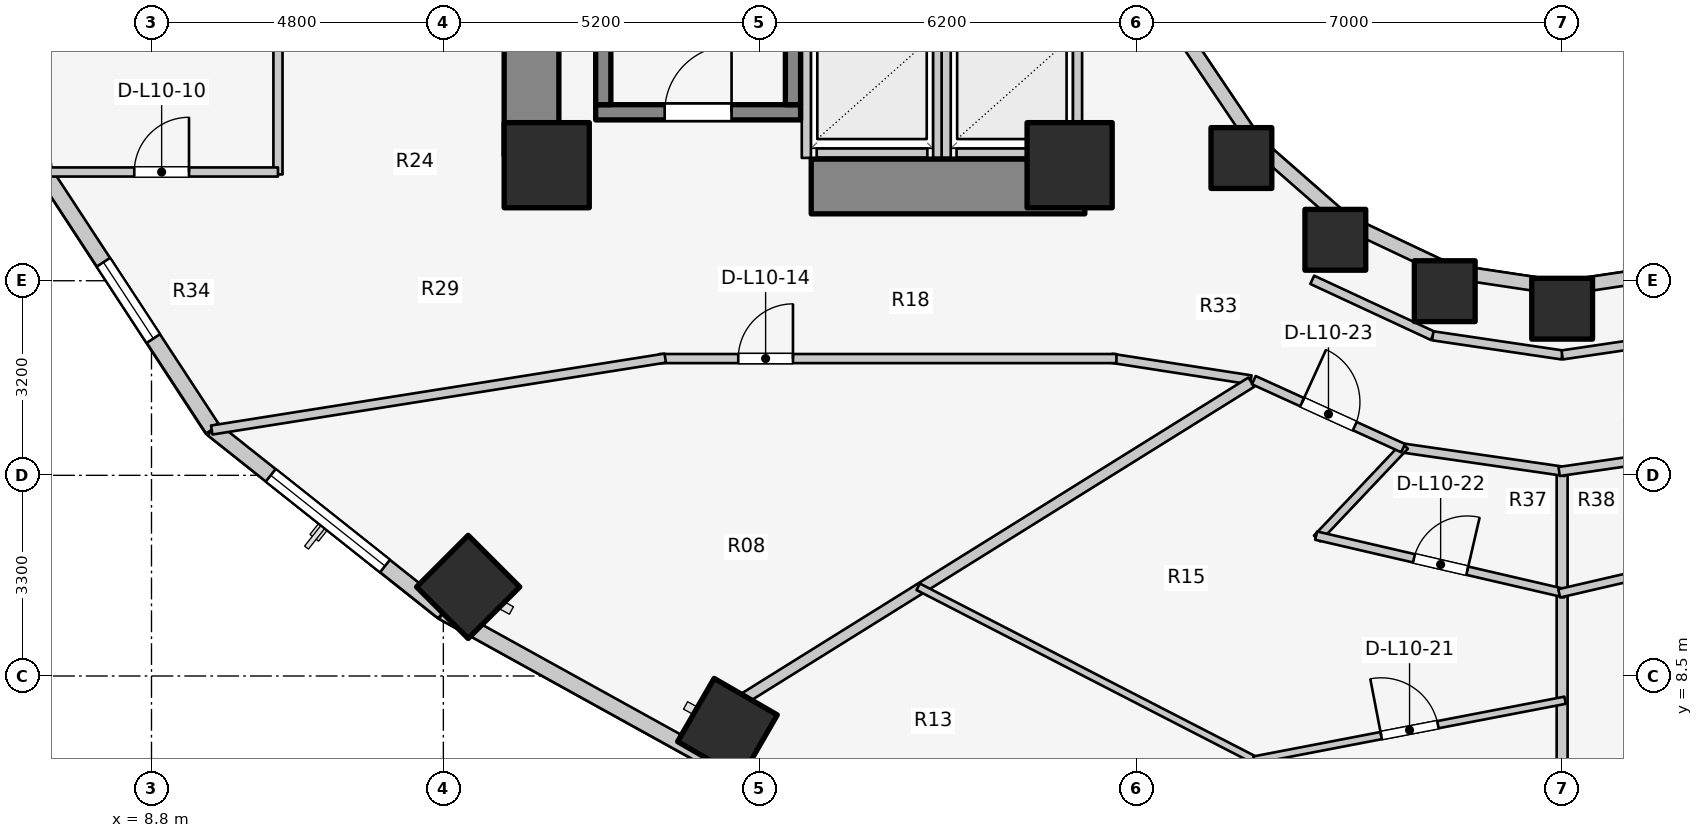
"""IFC4 building model, lengths in metres.
Left out: names, types, materials, properties, quantities, classifications, styles, units other than length and angle.
Written with IfcOpenShell. Run it as: python <this file> out.ifc"""

import sys

from ifc_helpers import new_model, si_unit, direction, frame, frame_2d, origin, origin_2d, place, context, subcontext, project, spatial, rectangle, extrude, element, fill, save


model = new_model("IFC4")
c1 = context("Model", 3, precision=1e-05, world=origin(), true_north=direction((0.0, 1.0)))
c2 = subcontext(c1, "Body", "Model", "MODEL_VIEW")
j1 = project(units=[si_unit("LENGTHUNIT", "METRE"), si_unit("PLANEANGLEUNIT", "RADIAN")], contexts=[c1])
p1 = place(None, origin())
s1 = spatial("IfcSite", under=j1, at=p1, CompositionType="ELEMENT")
p2 = place(p1, origin())
s2 = spatial("IfcBuilding", under=s1, at=p2, CompositionType="ELEMENT")
p3 = place(p2, frame((0.0, 0.0, 36.9)))
s3 = spatial("IfcBuildingStorey", under=s2, at=p3, CompositionType="ELEMENT", Elevation=36.9)
p4 = place(p3, frame((15.05, 17.05, 0.0), z_axis=(0.0, 0.0, 1.0), x_axis=(0.0, 1.0, 0.0)))
e1 = element("IfcWall", 1, at=p4, inside=s3, PredefinedType="SHEAR", context=c2, shape_type="SweptSolid", body=[
    extrude(rectangle(XDim=12.8, YDim=0.9, at=frame_2d((6.4, 0.0))), origin(), (0.0, 0.0, 1.0), 3.1),
])
p5 = place(p3, frame((19.65, 16.55, 0.0), z_axis=(0.0, 0.0, 1.0), x_axis=(1.0, 0.0, 0.0)))
e2 = element("IfcWall", 2, at=p5, inside=s3, PredefinedType="SHEAR", context=c2, shape_type="SweptSolid", body=[
    extrude(rectangle(XDim=4.5, YDim=0.9, at=frame_2d((2.25, 0.0))), origin(), (0.0, 0.0, 1.0), 3.1),
])
p6 = place(p3, frame((16.105, 17.77, 0.0), z_axis=(0.0, 0.0, 1.0), x_axis=(1.0, 0.0, 0.0)))
e3 = element("IfcWall", 3, at=p6, inside=s3, PredefinedType="SOLIDWALL", context=c2, shape_type="SweptSolid", body=[
    extrude(rectangle(XDim=3.37, YDim=0.25, at=frame_2d((1.685, 0.0))), origin(), (0.0, 0.0, 1.0), 3.1),
])
p7 = place(p6, frame((1.135, 0.0, 0.0)))
e4 = element("IfcOpeningElement", 4, at=p7, cuts=e3, PredefinedType="OPENING", context=c2, shape_type="SweptSolid", body=[
    extrude(rectangle(XDim=1.1, YDim=2.1, at=frame_2d((0.55, 1.05))), frame((0.0, 0.135, 0.0), z_axis=(0.0, -1.0, 0.0), x_axis=(1.0, 0.0, 0.0)), (0.0, 0.0, 1.0), 0.27),
])
for number, where, z_axis, x_axis in (
    (5, (16.23, 17.895, 0.0), (0.0, 0.0, 1.0), (0.0, 1.0, 0.0)),
    (6, (19.35, 17.895, 0.0), (0.0, 0.0, 1.0), (0.0, 1.0, 0.0)),
):
    element("IfcWall", number, at=place(p3, frame(where, z_axis=z_axis, x_axis=x_axis)), inside=s3, PredefinedType="SOLIDWALL", context=c2, shape_type="SweptSolid", body=[
        extrude(rectangle(XDim=7.81, YDim=0.25, at=frame_2d((3.905, 0.0))), origin(), (0.0, 0.0, 1.0), 3.1),
    ])
for number, where, z_axis, x_axis in (
    (7, (15.3, 16.9, 0.0), (0.0, 0.0, 1.0), (1.0, 0.0, 0.0)),
    (8, (23.9, 16.9, 0.0), (0.0, 0.0, 1.0), (1.0, 0.0, 0.0)),
):
    element("IfcColumn", number, at=place(p3, frame(where, z_axis=z_axis, x_axis=x_axis)), inside=s3, PredefinedType="COLUMN", context=c2, shape_type="SweptSolid", body=[
        extrude(rectangle(XDim=1.4, YDim=1.4, at=origin_2d()), origin(), (0.0, 0.0, 1.0), 3.1),
    ])
p8 = place(p3, frame((26.725, 17.018, 0.0), z_axis=(0.0, 0.0, 1.0), x_axis=(1.0, 0.0, 0.0)))
e9 = element("IfcColumn", 9, at=p8, inside=s3, PredefinedType="COLUMN", context=c2, shape_type="SweptSolid", body=[
    extrude(rectangle(XDim=1.0, YDim=1.0, at=origin_2d()), origin(), (0.0, 0.0, 1.0), 3.1),
])
p9 = place(p3, frame((14.008, 9.965, 0.0), z_axis=(0.0, 0.0, 1.0), x_axis=(-0.707106781187, -0.707106781187, 0.0)))
e10 = element("IfcColumn", 10, at=p9, inside=s3, PredefinedType="COLUMN", context=c2, shape_type="SweptSolid", body=[
    extrude(rectangle(XDim=1.2, YDim=1.2, at=origin_2d()), origin(), (0.0, 0.0, 1.0), 3.1),
])
p10 = place(p3, frame((28.27, 15.673, 0.0), z_axis=(0.0, 0.0, 1.0), x_axis=(1.0, 0.0, 0.0)))
e11 = element("IfcColumn", 11, at=p10, inside=s3, PredefinedType="COLUMN", context=c2, shape_type="SweptSolid", body=[
    extrude(rectangle(XDim=1.0, YDim=1.0, at=origin_2d()), origin(), (0.0, 0.0, 1.0), 3.1),
])
p11 = place(p3, frame((18.273, 7.641, 0.0), z_axis=(0.0, 0.0, 1.0), x_axis=(-0.5, -0.866025403784, 0.0)))
e12 = element("IfcColumn", 12, at=p11, inside=s3, PredefinedType="COLUMN", context=c2, shape_type="SweptSolid", body=[
    extrude(rectangle(XDim=1.2, YDim=1.2, at=origin_2d()), origin(), (0.0, 0.0, 1.0), 3.1),
])
for number, where, z_axis, x_axis in (
    (13, (30.069, 14.828, 0.0), (0.0, 0.0, 1.0), (1.0, 0.0, 0.0)),
    (14, (32.0, 14.54, 0.0), (0.0, 0.0, 1.0), (1.0, 0.0, 0.0)),
):
    element("IfcColumn", number, at=place(p3, frame(where, z_axis=z_axis, x_axis=x_axis)), inside=s3, PredefinedType="COLUMN", context=c2, shape_type="SweptSolid", body=[
        extrude(rectangle(XDim=1.0, YDim=1.0, at=origin_2d()), origin(), (0.0, 0.0, 1.0), 3.1),
    ])
p12 = place(p3, frame((25.834, 18.94, 0.0), z_axis=(0.0, 0.0, 1.0), x_axis=(0.558197800898, -0.829707909492, 0.0)))
e15 = element("IfcWall", 15, at=p12, inside=s3, PredefinedType="STANDARD", context=c2, shape_type="SweptSolid", body=[
    extrude(rectangle(XDim=2.027, YDim=0.23, at=frame_2d((1.013, 0.0))), origin(), (0.0, 0.0, 1.0), 2.16),
])
p13 = place(p3, frame((26.965, 17.258, 0.0), z_axis=(0.0, 0.0, 1.0), x_axis=(0.752576694707, -0.658504607869, 0.0)))
e16 = element("IfcWall", 16, at=p13, inside=s3, PredefinedType="STANDARD", context=c2, shape_type="SweptSolid", body=[
    extrude(rectangle(XDim=1.959, YDim=0.23, at=frame_2d((0.98, 0.0))), origin(), (0.0, 0.0, 1.0), 2.16),
])
p14 = place(p3, frame((28.44, 15.968, 0.0), z_axis=(0.0, 0.0, 1.0), x_axis=(0.904179699603, -0.427152280606, 0.0)))
e17 = element("IfcWall", 17, at=p14, inside=s3, PredefinedType="STANDARD", context=c2, shape_type="SweptSolid", body=[
    extrude(rectangle(XDim=1.899, YDim=0.23, at=frame_2d((0.95, 0.0))), origin(), (0.0, 0.0, 1.0), 2.16),
])
for number, where, z_axis, x_axis in (
    (18, (30.157, 15.157, 0.0), (0.0, 0.0, 1.0), (0.989, -0.149, 0.0)),
    (19, (32.0, 14.88, 0.0), (0.0, 0.0, 1.0), (0.989, 0.149, 0.0)),
):
    element("IfcWall", number, at=place(p3, frame(where, z_axis=z_axis, x_axis=x_axis)), inside=s3, PredefinedType="STANDARD", context=c2, shape_type="SweptSolid", body=[
        extrude(rectangle(XDim=1.864, YDim=0.23, at=frame_2d((0.932, 0.0))), origin(), (0.0, 0.0, 1.0), 2.16),
    ])
p15 = place(p3, frame((7.033, 16.795, 0.0), z_axis=(0.0, 0.0, 1.0), x_axis=(0.547702757047, -0.836672988642, 0.0)))
e20 = element("IfcWall", 20, at=p15, inside=s3, PredefinedType="STANDARD", context=c2, shape_type="SweptSolid", body=[
    extrude(rectangle(XDim=5.062, YDim=0.26, at=frame_2d((2.531, 0.0))), origin(), (0.0, 0.0, 1.0), 2.85),
])
p16 = place(p15, frame((1.781, 0.0, 0.75)))
e21 = element("IfcOpeningElement", 21, at=p16, cuts=e20, PredefinedType="OPENING", context=c2, shape_type="SweptSolid", body=[
    extrude(rectangle(XDim=1.5, YDim=1.6, at=frame_2d((0.75, 0.8))), frame((0.0, 0.14, 0.0), z_axis=(0.0, -1.0, 0.0), x_axis=(1.0, 0.0, 0.0)), (0.0, 0.0, 1.0), 0.28),
])
p17 = place(p3, frame((9.806, 12.559, 0.0), z_axis=(0.0, 0.0, 1.0), x_axis=(0.783123133379, -0.621866672179, 0.0)))
e22 = element("IfcWall", 22, at=p17, inside=s3, PredefinedType="STANDARD", context=c2, shape_type="SweptSolid", body=[
    extrude(rectangle(XDim=4.839, YDim=0.26, at=frame_2d((2.419, 0.0))), origin(), (0.0, 0.0, 1.0), 2.85),
])
p18 = place(p17, frame((1.219, 0.0, 0.75)))
e23 = element("IfcOpeningElement", 23, at=p18, cuts=e22, PredefinedType="OPENING", context=c2, shape_type="SweptSolid", body=[
    extrude(rectangle(XDim=2.4, YDim=1.7, at=frame_2d((1.2, 0.85))), frame((0.0, 0.14, 0.0), z_axis=(0.0, -1.0, 0.0), x_axis=(1.0, 0.0, 0.0)), (0.0, 0.0, 1.0), 0.28),
])
p19 = place(p3, frame((13.595, 9.55, 0.0), z_axis=(0.0, 0.0, 1.0), x_axis=(0.875137303239, -0.483874674352, 0.0)))
e24 = element("IfcWall", 24, at=p19, inside=s3, PredefinedType="STANDARD", context=c2, shape_type="SweptSolid", body=[
    extrude(rectangle(XDim=4.985, YDim=0.26, at=frame_2d((2.493, 0.0))), origin(), (0.0, 0.0, 1.0), 2.85),
])
p20 = place(p3, frame((17.958, 7.138, 0.0), z_axis=(0.0, 0.0, 1.0), x_axis=(0.958843593522, -0.283934786811, 0.0)))
e25 = element("IfcWall", 25, at=p20, inside=s3, PredefinedType="STANDARD", context=c2, shape_type="SweptSolid", body=[
    extrude(rectangle(XDim=5.955, YDim=0.26, at=frame_2d((2.978, 0.0))), origin(), (0.0, 0.0, 1.0), 2.85),
])
p21 = place(p20, frame((2.228, 0.0, 0.75)))
e26 = element("IfcOpeningElement", 26, at=p21, cuts=e25, PredefinedType="OPENING", context=c2, shape_type="SweptSolid", body=[
    extrude(rectangle(XDim=1.5, YDim=1.6, at=frame_2d((0.75, 0.8))), frame((0.0, 0.14, 0.0), z_axis=(0.0, -1.0, 0.0), x_axis=(1.0, 0.0, 0.0)), (0.0, 0.0, 1.0), 0.28),
])
p22 = place(p3, frame((19.74, 17.1, 0.0), z_axis=(0.0, 0.0, 1.0), x_axis=(1.0, 0.0, 0.0)))
e27 = element("IfcWall", 27, at=p22, inside=s3, PredefinedType="SOLIDWALL", context=c2, shape_type="SweptSolid", body=[
    extrude(rectangle(XDim=1.82, YDim=0.15, at=frame_2d((0.91, 0.0))), origin(), (0.0, 0.0, 1.0), 2.855),
])
p23 = place(p3, frame((19.57, 17.02, 0.0), z_axis=(0.0, 0.0, 1.0), x_axis=(0.0, 1.0, 0.0)))
e28 = element("IfcWall", 28, at=p23, inside=s3, PredefinedType="SOLIDWALL", context=c2, shape_type="SweptSolid", body=[
    extrude(rectangle(XDim=2.22, YDim=0.15, at=frame_2d((1.11, 0.0))), origin(), (0.0, 0.0, 1.0), 2.12),
])
p24 = place(p3, frame((21.73, 17.02, 0.0), z_axis=(0.0, 0.0, 1.0), x_axis=(0.0, 1.0, 0.0)))
e29 = element("IfcWall", 29, at=p24, inside=s3, PredefinedType="SOLIDWALL", context=c2, shape_type="SweptSolid", body=[
    extrude(rectangle(XDim=2.22, YDim=0.15, at=frame_2d((1.11, 0.0))), origin(), (0.0, 0.0, 1.0), 2.855),
])
p25 = place(p3, frame((22.04, 17.1, 0.0), z_axis=(0.0, 0.0, 1.0), x_axis=(1.0, 0.0, 0.0)))
e30 = element("IfcWall", 30, at=p25, inside=s3, PredefinedType="SOLIDWALL", context=c2, shape_type="SweptSolid", body=[
    extrude(rectangle(XDim=1.82, YDim=0.15, at=frame_2d((0.91, 0.0))), origin(), (0.0, 0.0, 1.0), 2.12),
])
p26 = place(p3, frame((21.87, 17.02, 0.0), z_axis=(0.0, 0.0, 1.0), x_axis=(0.0, 1.0, 0.0)))
e31 = element("IfcWall", 31, at=p26, inside=s3, PredefinedType="SOLIDWALL", context=c2, shape_type="SweptSolid", body=[
    extrude(rectangle(XDim=2.22, YDim=0.15, at=frame_2d((1.11, 0.0))), origin(), (0.0, 0.0, 1.0), 2.855),
])
p27 = place(p3, frame((24.03, 17.02, 0.0), z_axis=(0.0, 0.0, 1.0), x_axis=(0.0, 1.0, 0.0)))
e32 = element("IfcWall", 32, at=p27, inside=s3, PredefinedType="SOLIDWALL", context=c2, shape_type="SweptSolid", body=[
    extrude(rectangle(XDim=2.22, YDim=0.15, at=frame_2d((1.11, 0.0))), origin(), (0.0, 0.0, 1.0), 2.12),
])
p28 = place(p3, frame((27.89, 15.015, 0.0), z_axis=(0.0, 0.0, 1.0), x_axis=(0.906943449489, -0.421252393975, 0.0)))
e33 = element("IfcWall", 33, at=p28, inside=s3, PredefinedType="PARTITIONING", context=c2, shape_type="SweptSolid", body=[
    extrude(rectangle(XDim=2.186, YDim=0.15, at=frame_2d((1.093, 0.0))), origin(), (0.0, 0.0, 1.0), 2.237),
])
for number, where, z_axis, x_axis in (
    (34, (29.873, 14.094, 0.0), (0.0, 0.0, 1.0), (0.989, -0.146, 0.0)),
    (35, (32.0, 13.78, 0.0), (0.0, 0.0, 1.0), (0.989, 0.146, 0.0)),
):
    element("IfcWall", number, at=place(p3, frame(where, z_axis=z_axis, x_axis=x_axis)), inside=s3, PredefinedType="PARTITIONING", context=c2, shape_type="SweptSolid", body=[
        extrude(rectangle(XDim=2.151, YDim=0.15, at=frame_2d((1.075, 0.0))), origin(), (0.0, 0.0, 1.0), 2.237),
    ])
p29 = place(p3, frame((10.88, 16.748, 0.0), z_axis=(0.0, 0.0, 1.0), x_axis=(0.0, 1.0, 0.0)))
e36 = element("IfcWall", 36, at=p29, inside=s3, PredefinedType="PARTITIONING", context=c2, shape_type="SweptSolid", body=[
    extrude(rectangle(XDim=12.503, YDim=0.15, at=frame_2d((6.252, 0.0))), origin(), (0.0, 0.0, 1.0), 2.12),
])
p30 = place(p3, frame((7.014, 16.788, 0.0), z_axis=(0.0, 0.0, 1.0), x_axis=(1.0, 0.0, 0.0)))
e37 = element("IfcWall", 37, at=p30, inside=s3, PredefinedType="PARTITIONING", context=c2, shape_type="SweptSolid", body=[
    extrude(rectangle(XDim=3.866, YDim=0.15, at=frame_2d((1.933, 0.0))), origin(), (0.0, 0.0, 1.0), 2.855),
])
p31 = place(p30, frame((1.503, 0.0, 0.0)))
e38 = element("IfcOpeningElement", 38, at=p31, cuts=e37, PredefinedType="OPENING", context=c2, shape_type="SweptSolid", body=[
    extrude(rectangle(XDim=0.9, YDim=2.1, at=frame_2d((0.45, 1.05))), frame((0.0, 0.085, 0.0), z_axis=(0.0, -1.0, 0.0), x_axis=(1.0, 0.0, 0.0)), (0.0, 0.0, 1.0), 0.17),
])
p32 = place(p3, frame((26.881, 13.369, 0.0), z_axis=(0.0, 0.0, 1.0), x_axis=(-0.988184633586, 0.153268163508, 0.0)))
e39 = element("IfcWall", 39, at=p32, inside=s3, PredefinedType="PARTITIONING", context=c2, shape_type="SweptSolid", body=[
    extrude(rectangle(XDim=2.318, YDim=0.15, at=frame_2d((1.159, 0.0))), origin(), (0.0, 0.0, 1.0), 2.237),
])
p33 = place(p3, frame((17.15, 13.72, 0.0), z_axis=(0.0, 0.0, 1.0), x_axis=(1.0, 0.0, 0.0)))
e40 = element("IfcWall", 40, at=p33, inside=s3, PredefinedType="PARTITIONING", context=c2, shape_type="SweptSolid", body=[
    extrude(rectangle(XDim=7.52, YDim=0.15, at=frame_2d((3.76, 0.0))), origin(), (0.0, 0.0, 1.0), 2.237),
])
p34 = place(p33, frame((1.3, 0.0, 0.0)))
e41 = element("IfcOpeningElement", 41, at=p34, cuts=e40, PredefinedType="OPENING", context=c2, shape_type="SweptSolid", body=[
    extrude(rectangle(XDim=0.9, YDim=2.1, at=frame_2d((0.45, 1.05))), frame((0.0, 0.085, 0.0), z_axis=(0.0, -1.0, 0.0), x_axis=(1.0, 0.0, 0.0)), (0.0, 0.0, 1.0), 0.17),
])
p35 = place(p3, frame((17.25, 13.728, 0.0), z_axis=(0.0, 0.0, 1.0), x_axis=(-0.987655781226, -0.156639898525, 0.0)))
e42 = element("IfcWall", 42, at=p35, inside=s3, PredefinedType="PARTITIONING", context=c2, shape_type="SweptSolid", body=[
    extrude(rectangle(XDim=7.552, YDim=0.15, at=frame_2d((3.776, 0.0))), origin(), (0.0, 0.0, 1.0), 2.069),
])
p36 = place(p3, frame((26.888, 13.332, 0.0), z_axis=(0.0, 0.0, 1.0), x_axis=(-0.848647785721, -0.52895834977, 0.0)))
e43 = element("IfcWall", 43, at=p36, inside=s3, PredefinedType="PARTITIONING", context=c2, shape_type="SweptSolid", body=[
    extrude(rectangle(XDim=9.81, YDim=0.18, at=frame_2d((4.905, 0.0))), origin(), (0.0, 0.0, 1.0), 2.237),
])
p37 = place(p3, frame((32.0, 11.815, 0.0), z_axis=(0.0, 0.0, 1.0), x_axis=(0.0, -1.0, 0.0)))
e44 = element("IfcWall", 44, at=p37, inside=s3, PredefinedType="PARTITIONING", context=c2, shape_type="SweptSolid", body=[
    extrude(rectangle(XDim=5.715, YDim=0.18, at=frame_2d((2.857, 0.0))), origin(), (0.0, 0.0, 1.0), 2.237),
])
p38 = place(p3, frame((21.409, 9.967, 0.0), z_axis=(0.0, 0.0, 1.0), x_axis=(0.889172609005, -0.457571930296, 0.0)))
e45 = element("IfcWall", 45, at=p38, inside=s3, PredefinedType="MOVABLE", context=c2, shape_type="SweptSolid", body=[
    extrude(rectangle(XDim=6.232, YDim=0.12, at=frame_2d((3.116, 0.0))), origin(), (0.0, 0.0, 1.0), 2.237),
])
p39 = place(p3, frame((26.932, 7.118, 0.0), z_axis=(0.0, 0.0, 1.0), x_axis=(0.982039182538, 0.188677089126, 0.0)))
e46 = element("IfcWall", 46, at=p39, inside=s3, PredefinedType="MOVABLE", context=c2, shape_type="SweptSolid", body=[
    extrude(rectangle(XDim=5.211, YDim=0.12, at=frame_2d((2.605, 0.0))), origin(), (0.0, 0.0, 1.0), 2.237),
])
p40 = place(p39, frame((2.131, 0.0, 0.0)))
e47 = element("IfcOpeningElement", 47, at=p40, cuts=e46, PredefinedType="OPENING", context=c2, shape_type="SweptSolid", body=[
    extrude(rectangle(XDim=0.95, YDim=2.1, at=frame_2d((0.475, 1.05))), frame((0.0, 0.07, 0.0), z_axis=(0.0, -1.0, 0.0), x_axis=(1.0, 0.0, 0.0)), (0.0, 0.0, 1.0), 0.14),
])
p41 = place(p3, frame((29.329, 12.256, 0.0), z_axis=(0.0, 0.0, 1.0), x_axis=(0.989701115085, -0.143149232617, 0.0)))
e48 = element("IfcWall", 48, at=p41, inside=s3, PredefinedType="PARTITIONING", context=c2, shape_type="SweptSolid", body=[
    extrude(rectangle(XDim=2.749, YDim=0.15, at=frame_2d((1.375, 0.0))), origin(), (0.0, 0.0, 1.0), 2.237),
])
p42 = place(p3, frame((29.413, 12.285, 0.0), z_axis=(0.0, 0.0, 1.0), x_axis=(-0.687544693502, -0.72614206216, 0.0)))
e49 = element("IfcWall", 49, at=p42, inside=s3, PredefinedType="PLUMBINGWALL", context=c2, shape_type="SweptSolid", body=[
    extrude(rectangle(XDim=2.1, YDim=0.14, at=frame_2d((1.05, 0.0))), origin(), (0.0, 0.0, 1.0), 2.855),
])
p43 = place(p3, frame((27.954, 10.808, 0.0), z_axis=(0.0, 0.0, 1.0), x_axis=(0.974148813221, -0.225907259071, 0.0)))
e50 = element("IfcWall", 50, at=p43, inside=s3, PredefinedType="PLUMBINGWALL", context=c2, shape_type="SweptSolid", body=[
    extrude(rectangle(XDim=4.203, YDim=0.14, at=frame_2d((2.102, 0.0))), origin(), (0.0, 0.0, 1.0), 2.237),
])
p44 = place(p43, frame((1.652, 0.0, 0.0)))
e51 = element("IfcOpeningElement", 51, at=p44, cuts=e50, PredefinedType="OPENING", context=c2, shape_type="SweptSolid", body=[
    extrude(rectangle(XDim=0.9, YDim=2.1, at=frame_2d((0.45, 1.05))), frame((0.0, 0.08, 0.0), z_axis=(0.0, -1.0, 0.0), x_axis=(1.0, 0.0, 0.0)), (0.0, 0.0, 1.0), 0.16),
])
p45 = place(p3, frame((26.929, 13.365, 0.0), z_axis=(0.0, 0.0, 1.0), x_axis=(0.910186679378, -0.414198272186, 0.0)))
e52 = element("IfcWall", 52, at=p45, inside=s3, PredefinedType="PARTITIONING", context=c2, shape_type="SweptSolid", body=[
    extrude(rectangle(XDim=2.698, YDim=0.15, at=frame_2d((1.349, 0.0))), origin(), (0.0, 0.0, 1.0), 2.237),
])
p46 = place(p45, frame((0.874, 0.0, 0.0)))
e53 = element("IfcOpeningElement", 53, at=p46, cuts=e52, PredefinedType="OPENING", context=c2, shape_type="SweptSolid", body=[
    extrude(rectangle(XDim=0.95, YDim=2.1, at=frame_2d((0.475, 1.05))), frame((0.0, 0.085, 0.0), z_axis=(0.0, -1.0, 0.0), x_axis=(1.0, 0.0, 0.0)), (0.0, 0.0, 1.0), 0.17),
])
p47 = place(p3, frame((31.95, 11.863, 0.0), z_axis=(0.0, 0.0, 1.0), x_axis=(0.989701115085, 0.143149232617, 0.0)))
e54 = element("IfcWall", 54, at=p47, inside=s3, PredefinedType="PARTITIONING", context=c2, shape_type="SweptSolid", body=[
    extrude(rectangle(XDim=2.749, YDim=0.15, at=frame_2d((1.375, 0.0))), origin(), (0.0, 0.0, 1.0), 2.237),
])
p48 = place(p3, frame((31.951, 9.859, 0.0), z_axis=(0.0, 0.0, 1.0), x_axis=(0.974148813221, 0.225907259071, 0.0)))
e55 = element("IfcWall", 55, at=p48, inside=s3, PredefinedType="PLUMBINGWALL", context=c2, shape_type="SweptSolid", body=[
    extrude(rectangle(XDim=4.203, YDim=0.14, at=frame_2d((2.102, 0.0))), origin(), (0.0, 0.0, 1.0), 2.237),
])
p49 = place(p48, frame((1.652, 0.0, 0.0)))
e56 = element("IfcOpeningElement", 56, at=p49, cuts=e55, PredefinedType="OPENING", context=c2, shape_type="SweptSolid", body=[
    extrude(rectangle(XDim=0.9, YDim=2.1, at=frame_2d((0.45, 1.05))), frame((0.0, 0.08, 0.0), z_axis=(0.0, -1.0, 0.0), x_axis=(1.0, 0.0, 0.0)), (0.0, 0.0, 1.0), 0.16),
])
p50 = place(p16, origin())
e57 = element("IfcWindow", 57, at=p50, inside=s3, PartitioningType="SINGLE_PANEL", PredefinedType="WINDOW", context=c2, shape_type="SweptSolid", body=[
    extrude(rectangle(XDim=1.5, YDim=1.6, at=frame_2d((0.75, 0.8))), frame((0.0, 0.03, 0.0), z_axis=(0.0, -1.0, 0.0), x_axis=(1.0, 0.0, 0.0)), (0.0, 0.0, 1.0), 0.06),
])
fill(e21, e57)
p51 = place(p18, origin())
e58 = element("IfcWindow", 58, at=p51, inside=s3, PartitioningType="SINGLE_PANEL", PredefinedType="WINDOW", context=c2, shape_type="SweptSolid", body=[
    extrude(rectangle(XDim=2.4, YDim=1.7, at=frame_2d((1.2, 0.85))), frame((0.0, 0.03, 0.0), z_axis=(0.0, -1.0, 0.0), x_axis=(1.0, 0.0, 0.0)), (0.0, 0.0, 1.0), 0.06),
])
fill(e23, e58)
p52 = place(p7, origin())
e59 = element("IfcDoor", 59, at=p52, inside=s3, OperationType="SINGLE_SWING_RIGHT", PredefinedType="DOOR", context=c2, shape_type="SweptSolid", body=[
    extrude(rectangle(XDim=1.1, YDim=2.1, at=frame_2d((0.55, 1.05))), frame((0.0, 0.025, 0.0), z_axis=(0.0, -1.0, 0.0), x_axis=(1.0, 0.0, 0.0)), (0.0, 0.0, 1.0), 0.05),
])
fill(e4, e59)
p53 = place(p31, origin())
e60 = element("IfcDoor", 60, at=p53, inside=s3, OperationType="SINGLE_SWING_RIGHT", PredefinedType="DOOR", context=c2, shape_type="SweptSolid", body=[
    extrude(rectangle(XDim=0.9, YDim=2.1, at=frame_2d((0.45, 1.05))), frame((0.0, 0.025, 0.0), z_axis=(0.0, -1.0, 0.0), x_axis=(1.0, 0.0, 0.0)), (0.0, 0.0, 1.0), 0.05),
])
fill(e38, e60)
p54 = place(p34, origin())
e61 = element("IfcDoor", 61, at=p54, inside=s3, OperationType="SINGLE_SWING_RIGHT", PredefinedType="DOOR", context=c2, shape_type="SweptSolid", body=[
    extrude(rectangle(XDim=0.9, YDim=2.1, at=frame_2d((0.45, 1.05))), frame((0.0, 0.025, 0.0), z_axis=(0.0, -1.0, 0.0), x_axis=(1.0, 0.0, 0.0)), (0.0, 0.0, 1.0), 0.05),
])
fill(e41, e61)
p55 = place(p40, origin())
e62 = element("IfcDoor", 62, at=p55, inside=s3, OperationType="SINGLE_SWING_LEFT", PredefinedType="DOOR", context=c2, shape_type="SweptSolid", body=[
    extrude(rectangle(XDim=0.95, YDim=2.1, at=frame_2d((0.475, 1.05))), frame((0.0, 0.025, 0.0), z_axis=(0.0, -1.0, 0.0), x_axis=(1.0, 0.0, 0.0)), (0.0, 0.0, 1.0), 0.05),
])
fill(e47, e62)
p56 = place(p44, origin())
e63 = element("IfcDoor", 63, at=p56, inside=s3, OperationType="SINGLE_SWING_RIGHT", PredefinedType="DOOR", context=c2, shape_type="SweptSolid", body=[
    extrude(rectangle(XDim=0.9, YDim=2.1, at=frame_2d((0.45, 1.05))), frame((0.0, 0.025, 0.0), z_axis=(0.0, -1.0, 0.0), x_axis=(1.0, 0.0, 0.0)), (0.0, 0.0, 1.0), 0.05),
])
fill(e51, e63)
p57 = place(p46, origin())
e64 = element("IfcDoor", 64, at=p57, inside=s3, OperationType="SINGLE_SWING_LEFT", PredefinedType="DOOR", context=c2, shape_type="SweptSolid", body=[
    extrude(rectangle(XDim=0.95, YDim=2.1, at=frame_2d((0.475, 1.05))), frame((0.0, 0.025, 0.0), z_axis=(0.0, -1.0, 0.0), x_axis=(1.0, 0.0, 0.0)), (0.0, 0.0, 1.0), 0.05),
])
fill(e53, e64)
save(model, sys.argv[1])
